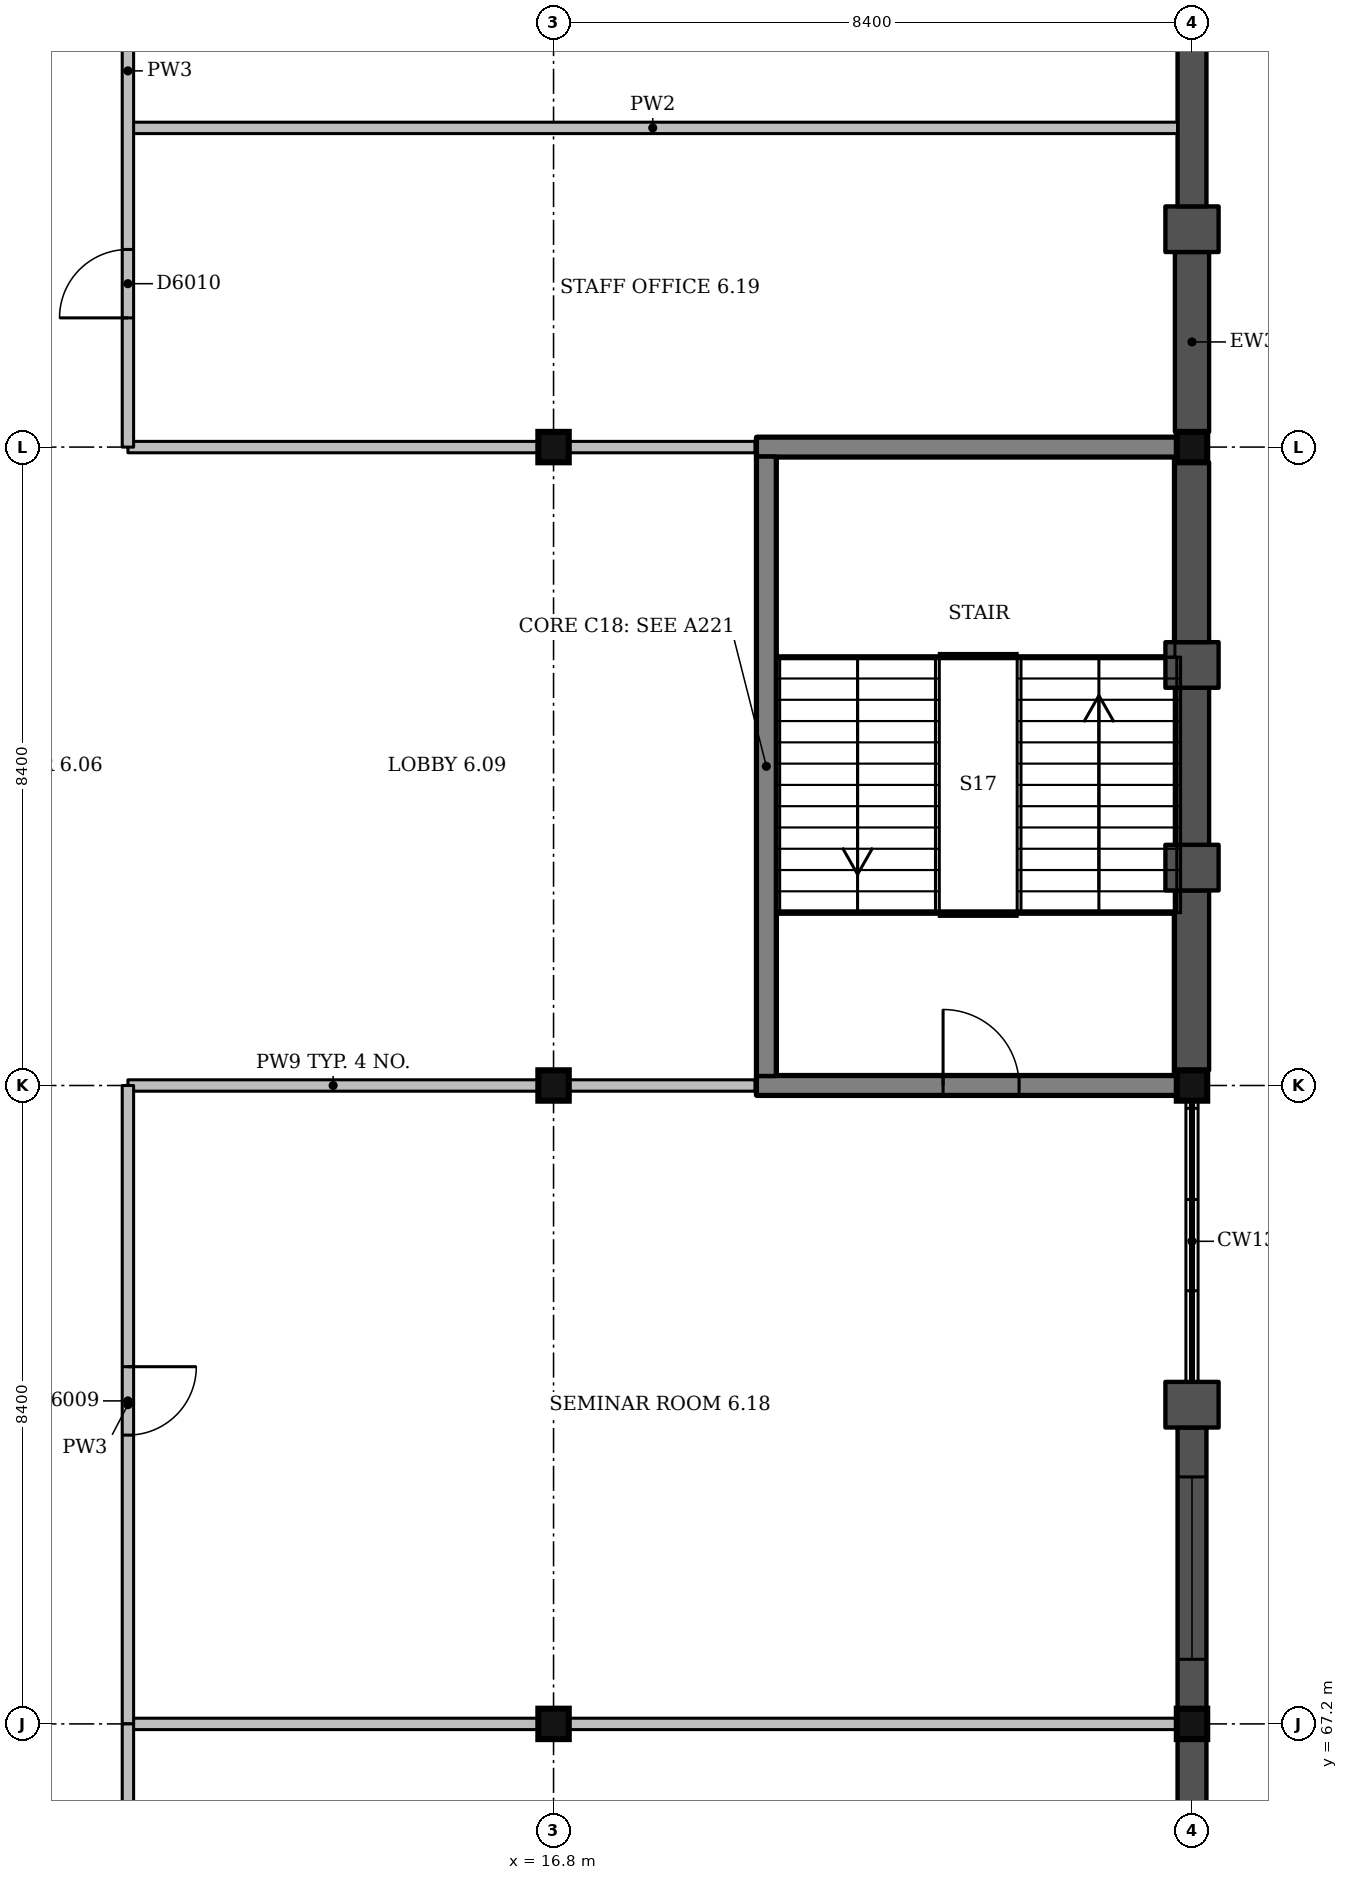
"""IFC4 building model, lengths in metres.
Left out: names, types, materials, properties, quantities, classifications, styles, units other than length and angle.
Written with IfcOpenShell. Run it as: python <this file> out.ifc"""

import sys

from ifc_helpers import new_model, si_unit, direction, frame, frame_2d, origin, origin_2d, place, context, subcontext, project, spatial, rectangle, extrude, element, fill, save


model = new_model("IFC4")
c1 = context("Model", 3, precision=1e-05, world=origin(), true_north=direction((0.0, 1.0)))
c2 = subcontext(c1, "Body", "Model", "MODEL_VIEW")
j1 = project(units=[si_unit("LENGTHUNIT", "METRE"), si_unit("PLANEANGLEUNIT", "RADIAN")], contexts=[c1])
p1 = place(None, origin())
s1 = spatial("IfcSite", under=j1, at=p1, CompositionType="ELEMENT")
p2 = place(p1, origin())
s2 = spatial("IfcBuilding", under=s1, at=p2, CompositionType="ELEMENT")
p3 = place(p2, frame((0.0, 0.0, 27.0)))
s3 = spatial("IfcBuildingStorey", under=s2, at=p3, CompositionType="ELEMENT", Elevation=27.0)
for number, where, z_axis, x_axis in (
    (1, (16.8, 67.2, 0.0), (0.0, 0.0, 1.0), (1.0, 0.0, 0.0)),
    (2, (16.8, 75.6, 0.0), (0.0, 0.0, 1.0), (1.0, 0.0, 0.0)),
    (3, (16.8, 84.0, 0.0), (0.0, 0.0, 1.0), (1.0, 0.0, 0.0)),
    (4, (25.2, 67.2, 0.0), (0.0, 0.0, 1.0), (1.0, 0.0, 0.0)),
    (5, (25.2, 75.6, 0.0), (0.0, 0.0, 1.0), (1.0, 0.0, 0.0)),
    (6, (25.2, 84.0, 0.0), (0.0, 0.0, 1.0), (1.0, 0.0, 0.0)),
):
    element("IfcColumn", number, at=place(p3, frame(where, z_axis=z_axis, x_axis=x_axis)), inside=s3, PredefinedType="COLUMN", context=c2, shape_type="SweptSolid", body=[
        extrude(rectangle(XDim=0.4, YDim=0.4, at=origin_2d()), origin(), (0.0, 0.0, 1.0), 4.5),
    ])
p4 = place(p3, frame((19.475, 75.6, 0.0), z_axis=(0.0, 0.0, 1.0), x_axis=(1.0, 0.0, 0.0)))
e7 = element("IfcWall", 7, at=p4, inside=s3, PredefinedType="SHEAR", context=c2, shape_type="SweptSolid", body=[
    extrude(rectangle(XDim=5.525, YDim=0.25, at=frame_2d((2.762, 0.0))), origin(), (0.0, 0.0, 1.0), 4.5),
])
p5 = place(p4, frame((2.45, 0.0, 0.0)))
e8 = element("IfcOpeningElement", 8, at=p5, cuts=e7, PredefinedType="OPENING", context=c2, shape_type="SweptSolid", body=[
    extrude(rectangle(XDim=1.0, YDim=2.1, at=frame_2d((0.5, 1.05))), frame((0.0, 0.135, 0.0), z_axis=(0.0, -1.0, 0.0), x_axis=(1.0, 0.0, 0.0)), (0.0, 0.0, 1.0), 0.27),
])
p6 = place(p3, frame((19.475, 84.0, 0.0), z_axis=(0.0, 0.0, 1.0), x_axis=(1.0, 0.0, 0.0)))
e9 = element("IfcWall", 9, at=p6, inside=s3, PredefinedType="SHEAR", context=c2, shape_type="SweptSolid", body=[
    extrude(rectangle(XDim=5.525, YDim=0.25, at=frame_2d((2.762, 0.0))), origin(), (0.0, 0.0, 1.0), 4.5),
])
p7 = place(p3, frame((19.6, 75.725, 0.0), z_axis=(0.0, 0.0, 1.0), x_axis=(0.0, 1.0, 0.0)))
e10 = element("IfcWall", 10, at=p7, inside=s3, PredefinedType="SHEAR", context=c2, shape_type="SweptSolid", body=[
    extrude(rectangle(XDim=8.15, YDim=0.25, at=frame_2d((4.075, 0.0))), origin(), (0.0, 0.0, 1.0), 4.5),
])
p8 = place(p3, frame((25.2, 64.633, 0.0), z_axis=(0.0, 0.0, 1.0), x_axis=(0.0, 1.0, 0.0)))
e11 = element("IfcWall", 11, at=p8, inside=s3, PredefinedType="SOLIDWALL", context=c2, shape_type="SweptSolid", body=[
    extrude(rectangle(XDim=2.367, YDim=0.38, at=frame_2d((1.183, 0.0))), origin(), (0.0, 0.0, 1.0), 3.35),
])
p9 = place(p3, frame((25.2, 67.4, 0.0), z_axis=(0.0, 0.0, 1.0), x_axis=(0.0, 1.0, 0.0)))
e12 = element("IfcWall", 12, at=p9, inside=s3, PredefinedType="SOLIDWALL", context=c2, shape_type="SweptSolid", body=[
    extrude(rectangle(XDim=3.7, YDim=0.38, at=frame_2d((1.85, 0.0))), origin(), (0.0, 0.0, 1.0), 3.35),
])
p10 = place(p9, frame((0.65, 0.0, 1.2)))
e13 = element("IfcOpeningElement", 13, at=p10, cuts=e12, PredefinedType="OPENING", context=c2, shape_type="SweptSolid", body=[
    extrude(rectangle(XDim=2.4, YDim=1.5, at=frame_2d((1.2, 0.75))), frame((0.0, 0.2, 0.0), z_axis=(0.0, -1.0, 0.0), x_axis=(1.0, 0.0, 0.0)), (0.0, 0.0, 1.0), 0.4),
])
p11 = place(p3, frame((25.2, 71.1, 0.0), z_axis=(0.0, 0.0, 1.0), x_axis=(0.0, 1.0, 0.0)))
e14 = element("IfcWall", 14, at=p11, inside=s3, PredefinedType="SOLIDWALL", context=c2, shape_type="SweptSolid", body=[
    extrude(rectangle(XDim=0.6, YDim=0.7, at=frame_2d((0.3, 0.0))), origin(), (0.0, 0.0, 1.0), 3.35),
])
p12 = place(p3, frame((25.2, 75.8, 0.0), z_axis=(0.0, 0.0, 1.0), x_axis=(0.0, 1.0, 0.0)))
e15 = element("IfcWall", 15, at=p12, inside=s3, PredefinedType="SOLIDWALL", context=c2, shape_type="SweptSolid", body=[
    extrude(rectangle(XDim=2.367, YDim=0.45, at=frame_2d((1.183, 0.0))), origin(), (0.0, 0.0, 1.0), 3.65),
])
p13 = place(p3, frame((25.2, 78.167, 0.0), z_axis=(0.0, 0.0, 1.0), x_axis=(0.0, 1.0, 0.0)))
e16 = element("IfcWall", 16, at=p13, inside=s3, PredefinedType="SOLIDWALL", context=c2, shape_type="SweptSolid", body=[
    extrude(rectangle(XDim=0.6, YDim=0.7, at=frame_2d((0.3, 0.0))), origin(), (0.0, 0.0, 1.0), 3.65),
])
p14 = place(p3, frame((25.2, 78.767, 0.0), z_axis=(0.0, 0.0, 1.0), x_axis=(0.0, 1.0, 0.0)))
e17 = element("IfcWall", 17, at=p14, inside=s3, PredefinedType="SOLIDWALL", context=c2, shape_type="SweptSolid", body=[
    extrude(rectangle(XDim=2.067, YDim=0.45, at=frame_2d((1.033, 0.0))), origin(), (0.0, 0.0, 1.0), 3.65),
])
p15 = place(p3, frame((25.2, 80.833, 0.0), z_axis=(0.0, 0.0, 1.0), x_axis=(0.0, 1.0, 0.0)))
e18 = element("IfcWall", 18, at=p15, inside=s3, PredefinedType="SOLIDWALL", context=c2, shape_type="SweptSolid", body=[
    extrude(rectangle(XDim=0.6, YDim=0.7, at=frame_2d((0.3, 0.0))), origin(), (0.0, 0.0, 1.0), 3.65),
])
p16 = place(p3, frame((25.2, 81.433, 0.0), z_axis=(0.0, 0.0, 1.0), x_axis=(0.0, 1.0, 0.0)))
e19 = element("IfcWall", 19, at=p16, inside=s3, PredefinedType="SOLIDWALL", context=c2, shape_type="SweptSolid", body=[
    extrude(rectangle(XDim=2.367, YDim=0.45, at=frame_2d((1.183, 0.0))), origin(), (0.0, 0.0, 1.0), 3.65),
])
p17 = place(p3, frame((25.2, 84.2, 0.0), z_axis=(0.0, 0.0, 1.0), x_axis=(0.0, 1.0, 0.0)))
e20 = element("IfcWall", 20, at=p17, inside=s3, PredefinedType="SOLIDWALL", context=c2, shape_type="SweptSolid", body=[
    extrude(rectangle(XDim=2.367, YDim=0.45, at=frame_2d((1.183, 0.0))), origin(), (0.0, 0.0, 1.0), 3.35),
])
p18 = place(p3, frame((25.2, 86.567, 0.0), z_axis=(0.0, 0.0, 1.0), x_axis=(0.0, 1.0, 0.0)))
e21 = element("IfcWall", 21, at=p18, inside=s3, PredefinedType="SOLIDWALL", context=c2, shape_type="SweptSolid", body=[
    extrude(rectangle(XDim=0.6, YDim=0.7, at=frame_2d((0.3, 0.0))), origin(), (0.0, 0.0, 1.0), 3.35),
])
p19 = place(p3, frame((25.2, 87.167, 0.0), z_axis=(0.0, 0.0, 1.0), x_axis=(0.0, 1.0, 0.0)))
e22 = element("IfcWall", 22, at=p19, inside=s3, PredefinedType="SOLIDWALL", context=c2, shape_type="SweptSolid", body=[
    extrude(rectangle(XDim=2.067, YDim=0.38, at=frame_2d((1.033, 0.0))), origin(), (0.0, 0.0, 1.0), 3.35),
])
p20 = place(p3, frame((11.2, 67.2, 0.0), z_axis=(0.0, 0.0, 1.0), x_axis=(1.0, 0.0, 0.0)))
e23 = element("IfcWall", 23, at=p20, inside=s3, PredefinedType="PARTITIONING", context=c2, shape_type="SweptSolid", body=[
    extrude(rectangle(XDim=5.4, YDim=0.15, at=frame_2d((2.7, 0.0))), origin(), (0.0, 0.0, 1.0), 3.4),
])
p21 = place(p3, frame((17.0, 67.2, 0.0), z_axis=(0.0, 0.0, 1.0), x_axis=(1.0, 0.0, 0.0)))
e24 = element("IfcWall", 24, at=p21, inside=s3, PredefinedType="PARTITIONING", context=c2, shape_type="SweptSolid", body=[
    extrude(rectangle(XDim=8.0, YDim=0.15, at=frame_2d((4.0, 0.0))), origin(), (0.0, 0.0, 1.0), 3.35),
])
p22 = place(p3, frame((11.2, 75.6, 0.0), z_axis=(0.0, 0.0, 1.0), x_axis=(1.0, 0.0, 0.0)))
e25 = element("IfcWall", 25, at=p22, inside=s3, PredefinedType="PARTITIONING", context=c2, shape_type="SweptSolid", body=[
    extrude(rectangle(XDim=5.4, YDim=0.15, at=frame_2d((2.7, 0.0))), origin(), (0.0, 0.0, 1.0), 3.4),
])
p23 = place(p3, frame((17.0, 75.6, 0.0), z_axis=(0.0, 0.0, 1.0), x_axis=(1.0, 0.0, 0.0)))
e26 = element("IfcWall", 26, at=p23, inside=s3, PredefinedType="PARTITIONING", context=c2, shape_type="SweptSolid", body=[
    extrude(rectangle(XDim=2.45, YDim=0.15, at=frame_2d((1.225, 0.0))), origin(), (0.0, 0.0, 1.0), 3.4),
])
p24 = place(p3, frame((11.2, 84.0, 0.0), z_axis=(0.0, 0.0, 1.0), x_axis=(1.0, 0.0, 0.0)))
e27 = element("IfcWall", 27, at=p24, inside=s3, PredefinedType="PARTITIONING", context=c2, shape_type="SweptSolid", body=[
    extrude(rectangle(XDim=5.4, YDim=0.15, at=frame_2d((2.7, 0.0))), origin(), (0.0, 0.0, 1.0), 3.4),
])
p25 = place(p3, frame((17.0, 84.0, 0.0), z_axis=(0.0, 0.0, 1.0), x_axis=(1.0, 0.0, 0.0)))
e28 = element("IfcWall", 28, at=p25, inside=s3, PredefinedType="PARTITIONING", context=c2, shape_type="SweptSolid", body=[
    extrude(rectangle(XDim=2.45, YDim=0.15, at=frame_2d((1.225, 0.0))), origin(), (0.0, 0.0, 1.0), 3.4),
])
p26 = place(p3, frame((11.2, 88.2, 0.0), z_axis=(0.0, 0.0, 1.0), x_axis=(1.0, 0.0, 0.0)))
e29 = element("IfcWall", 29, at=p26, inside=s3, PredefinedType="PARTITIONING", context=c2, shape_type="SweptSolid", body=[
    extrude(rectangle(XDim=13.81, YDim=0.15, at=frame_2d((6.905, 0.0))), origin(), (0.0, 0.0, 1.0), 3.35),
])
p27 = place(p3, frame((11.2, 67.2, 0.0), z_axis=(0.0, 0.0, 1.0), x_axis=(0.0, 1.0, 0.0)))
e30 = element("IfcWall", 30, at=p27, inside=s3, PredefinedType="PARTITIONING", context=c2, shape_type="SweptSolid", body=[
    extrude(rectangle(XDim=8.4, YDim=0.15, at=frame_2d((4.2, 0.0))), origin(), (0.0, 0.0, 1.0), 3.4),
])
p28 = place(p27, frame((3.8, 0.0, 0.0)))
e31 = element("IfcOpeningElement", 31, at=p28, cuts=e30, PredefinedType="OPENING", context=c2, shape_type="SweptSolid", body=[
    extrude(rectangle(XDim=0.9, YDim=2.1, at=frame_2d((0.45, 1.05))), frame((0.0, 0.085, 0.0), z_axis=(0.0, -1.0, 0.0), x_axis=(1.0, 0.0, 0.0)), (0.0, 0.0, 1.0), 0.17),
])
p29 = place(p3, frame((11.2, 84.0, 0.0), z_axis=(0.0, 0.0, 1.0), x_axis=(0.0, 1.0, 0.0)))
e32 = element("IfcWall", 32, at=p29, inside=s3, PredefinedType="PARTITIONING", context=c2, shape_type="SweptSolid", body=[
    extrude(rectangle(XDim=16.8, YDim=0.15, at=frame_2d((8.4, 0.0))), origin(), (0.0, 0.0, 1.0), 3.4),
])
p30 = place(p29, frame((1.7, 0.0, 0.0)))
e33 = element("IfcOpeningElement", 33, at=p30, cuts=e32, PredefinedType="OPENING", context=c2, shape_type="SweptSolid", body=[
    extrude(rectangle(XDim=0.9, YDim=2.1, at=frame_2d((0.45, 1.05))), frame((0.0, 0.085, 0.0), z_axis=(0.0, -1.0, 0.0), x_axis=(1.0, 0.0, 0.0)), (0.0, 0.0, 1.0), 0.17),
])
p31 = place(p29, frame((5.9, 0.0, 0.0)))
e34 = element("IfcOpeningElement", 34, at=p31, cuts=e32, PredefinedType="OPENING", context=c2, shape_type="SweptSolid", body=[
    extrude(rectangle(XDim=0.9, YDim=2.1, at=frame_2d((0.45, 1.05))), frame((0.0, 0.085, 0.0), z_axis=(0.0, -1.0, 0.0), x_axis=(1.0, 0.0, 0.0)), (0.0, 0.0, 1.0), 0.17),
])
p32 = place(p29, frame((12.2, 0.0, 0.0)))
e35 = element("IfcOpeningElement", 35, at=p32, cuts=e32, PredefinedType="OPENING", context=c2, shape_type="SweptSolid", body=[
    extrude(rectangle(XDim=0.9, YDim=2.1, at=frame_2d((0.45, 1.05))), frame((0.0, 0.085, 0.0), z_axis=(0.0, -1.0, 0.0), x_axis=(1.0, 0.0, 0.0)), (0.0, 0.0, 1.0), 0.17),
])
p33 = place(p3, frame((11.2, 50.4, 0.0), z_axis=(0.0, 0.0, 1.0), x_axis=(0.0, 1.0, 0.0)))
e36 = element("IfcWall", 36, at=p33, inside=s3, PredefinedType="PARTITIONING", context=c2, shape_type="SweptSolid", body=[
    extrude(rectangle(XDim=16.8, YDim=0.15, at=frame_2d((8.4, 0.0))), origin(), (0.0, 0.0, 1.0), 2.37),
])
p34 = place(p33, frame((3.8, 0.0, 0.0)))
e37 = element("IfcOpeningElement", 37, at=p34, cuts=e36, PredefinedType="OPENING", context=c2, shape_type="SweptSolid", body=[
    extrude(rectangle(XDim=1.0, YDim=2.1, at=frame_2d((0.5, 1.05))), frame((0.0, 0.085, 0.0), z_axis=(0.0, -1.0, 0.0), x_axis=(1.0, 0.0, 0.0)), (0.0, 0.0, 1.0), 0.17),
])
p35 = place(p33, frame((12.2, 0.0, 0.0)))
e38 = element("IfcOpeningElement", 38, at=p35, cuts=e36, PredefinedType="OPENING", context=c2, shape_type="SweptSolid", body=[
    extrude(rectangle(XDim=1.0, YDim=2.1, at=frame_2d((0.5, 1.05))), frame((0.0, 0.085, 0.0), z_axis=(0.0, -1.0, 0.0), x_axis=(1.0, 0.0, 0.0)), (0.0, 0.0, 1.0), 0.17),
])
p36 = place(p10, origin())
e39 = element("IfcWindow", 39, at=p36, inside=s3, PartitioningType="SINGLE_PANEL", PredefinedType="WINDOW", context=c2, shape_type="SweptSolid", body=[
    extrude(rectangle(XDim=2.4, YDim=1.5, at=frame_2d((1.2, 0.75))), frame((0.0, 0.15, 0.0), z_axis=(0.0, -1.0, 0.0), x_axis=(1.0, 0.0, 0.0)), (0.0, 0.0, 1.0), 0.06),
])
fill(e13, e39)
p37 = place(p28, origin())
e40 = element("IfcDoor", 40, at=p37, inside=s3, OperationType="SINGLE_SWING_RIGHT", PredefinedType="DOOR", context=c2, shape_type="SweptSolid", body=[
    extrude(rectangle(XDim=0.9, YDim=2.1, at=frame_2d((0.45, 1.05))), frame((0.0, 0.025, 0.0), z_axis=(0.0, -1.0, 0.0), x_axis=(1.0, 0.0, 0.0)), (0.0, 0.0, 1.0), 0.05),
])
fill(e31, e40)
p38 = place(p30, origin())
e41 = element("IfcDoor", 41, at=p38, inside=s3, OperationType="SINGLE_SWING_LEFT", PredefinedType="DOOR", context=c2, shape_type="SweptSolid", body=[
    extrude(rectangle(XDim=0.9, YDim=2.1, at=frame_2d((0.45, 1.05))), frame((0.0, 0.025, 0.0), z_axis=(0.0, -1.0, 0.0), x_axis=(1.0, 0.0, 0.0)), (0.0, 0.0, 1.0), 0.05),
])
fill(e33, e41)
p39 = place(p5, origin())
e42 = element("IfcDoor", 42, at=p39, inside=s3, OperationType="SINGLE_SWING_LEFT", PredefinedType="DOOR", context=c2, shape_type="SweptSolid", body=[
    extrude(rectangle(XDim=1.0, YDim=2.1, at=frame_2d((0.5, 1.05))), frame((0.0, 0.025, 0.0), z_axis=(0.0, -1.0, 0.0), x_axis=(1.0, 0.0, 0.0)), (0.0, 0.0, 1.0), 0.05),
])
fill(e8, e42)
save(model, sys.argv[1])
